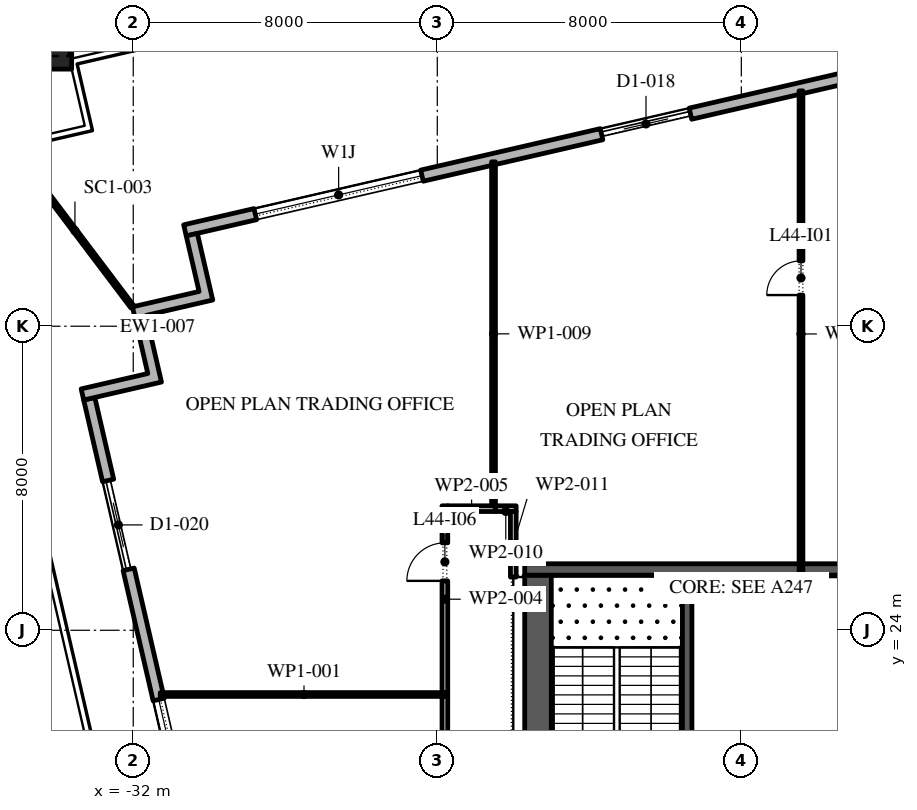
"""IFC4 building model, lengths in metres.
Left out: names, types, materials, properties, quantities, classifications, styles, units other than length and angle.
Written with IfcOpenShell. Run it as: python <this file> out.ifc"""

import sys

from ifc_helpers import new_model, si_unit, direction, frame, frame_2d, origin, origin_2d, place, context, subcontext, project, spatial, polyline, rectangle, outline, extrude, element, fill, save


model = new_model("IFC4")
c1 = context("Model", 3, precision=1e-05, world=origin(), true_north=direction((0.0, 1.0)))
c2 = subcontext(c1, "Body", "Model", "MODEL_VIEW")
j1 = project(units=[si_unit("LENGTHUNIT", "METRE"), si_unit("PLANEANGLEUNIT", "RADIAN")], contexts=[c1])
p1 = place(None, origin())
s1 = spatial("IfcSite", under=j1, at=p1, CompositionType="ELEMENT")
p2 = place(p1, origin())
s2 = spatial("IfcBuilding", under=s1, at=p2, CompositionType="ELEMENT")
p3 = place(p2, frame((0.0, 0.0, 201.0)))
s3 = spatial("IfcBuildingStorey", under=s2, at=p3, CompositionType="ELEMENT", Elevation=201.0)
p4 = place(p3, frame((-34.22, 39.365, 0.0), z_axis=(-0.018825755928, 0.08155896722, 0.996490705315), x_axis=(-0.974379530941, -0.22491004798, 0.0)))
e1 = element("IfcColumn", 1, at=p4, inside=s3, PredefinedType="COLUMN", context=c2, shape_type="SweptSolid", body=[
    extrude(rectangle(XDim=1.2, YDim=1.2, at=origin_2d()), origin(), (0.0, 0.0, 1.0), 4.215),
])
p5 = place(p3, frame((17.592, 45.657, 0.0), z_axis=(0.0, 0.0, 1.0), x_axis=(-0.974370243697, -0.224950279389, 0.0)))
e2 = element("IfcWall", 2, at=p5, inside=s3, PredefinedType="STANDARD", context=c2, shape_type="SweptSolid", body=[
    extrude(rectangle(XDim=49.5, YDim=0.3, at=frame_2d((24.75, 0.0))), origin(), (0.0, 0.0, 1.0), 4.0),
])
p6 = place(p5, frame((2.8, 0.0, 0.0)))
e3 = element("IfcOpeningElement", 3, at=p6, cuts=e2, PredefinedType="OPENING", context=c2, shape_type="SweptSolid", body=[
    extrude(rectangle(XDim=2.4, YDim=3.5, at=frame_2d((1.2, 1.75))), frame((0.0, 0.16, 0.0), z_axis=(0.0, -1.0, 0.0), x_axis=(1.0, 0.0, 0.0)), (0.0, 0.0, 1.0), 0.32),
])
p7 = place(p5, frame((9.9, 0.0, 0.45)))
e4 = element("IfcOpeningElement", 4, at=p7, cuts=e2, PredefinedType="OPENING", context=c2, shape_type="SweptSolid", body=[
    extrude(rectangle(XDim=4.5, YDim=2.45, at=frame_2d((2.25, 1.225))), frame((0.0, 0.16, 0.0), z_axis=(0.0, -1.0, 0.0), x_axis=(1.0, 0.0, 0.0)), (0.0, 0.0, 1.0), 0.32),
])
p8 = place(p5, frame((18.2, 0.0, 0.45)))
e5 = element("IfcOpeningElement", 5, at=p8, cuts=e2, PredefinedType="OPENING", context=c2, shape_type="SweptSolid", body=[
    extrude(rectangle(XDim=4.5, YDim=2.45, at=frame_2d((2.25, 1.225))), frame((0.0, 0.16, 0.0), z_axis=(0.0, -1.0, 0.0), x_axis=(1.0, 0.0, 0.0)), (0.0, 0.0, 1.0), 0.32),
])
p9 = place(p5, frame((26.5, 0.0, 0.45)))
e6 = element("IfcOpeningElement", 6, at=p9, cuts=e2, PredefinedType="OPENING", context=c2, shape_type="SweptSolid", body=[
    extrude(rectangle(XDim=4.5, YDim=2.5, at=frame_2d((2.25, 1.25))), frame((0.0, 0.16, 0.0), z_axis=(0.0, -1.0, 0.0), x_axis=(1.0, 0.0, 0.0)), (0.0, 0.0, 1.0), 0.32),
])
p10 = place(p5, frame((35.85, 0.0, 0.0)))
e7 = element("IfcOpeningElement", 7, at=p10, cuts=e2, PredefinedType="OPENING", context=c2, shape_type="SweptSolid", body=[
    extrude(rectangle(XDim=2.4, YDim=3.5, at=frame_2d((1.2, 1.75))), frame((0.0, 0.16, 0.0), z_axis=(0.0, -1.0, 0.0), x_axis=(1.0, 0.0, 0.0)), (0.0, 0.0, 1.0), 0.32),
])
p11 = place(p5, frame((43.1, 0.0, 0.45)))
e8 = element("IfcOpeningElement", 8, at=p11, cuts=e2, PredefinedType="OPENING", context=c2, shape_type="SweptSolid", body=[
    extrude(rectangle(XDim=4.5, YDim=2.675, at=frame_2d((2.25, 1.337))), frame((0.0, 0.16, 0.0), z_axis=(0.0, -1.0, 0.0), x_axis=(1.0, 0.0, 0.0)), (0.0, 0.0, 1.0), 0.32),
])
p12 = place(p3, frame((-33.157, 30.092, 0.0), z_axis=(0.0, 0.0, 1.0), x_axis=(0.224950279389, -0.974370243697, 0.0)))
e9 = element("IfcWall", 9, at=p12, inside=s3, PredefinedType="STANDARD", context=c2, shape_type="SweptSolid", body=[
    extrude(rectangle(XDim=49.5, YDim=0.3, at=frame_2d((24.75, 0.0))), origin(), (0.0, 0.0, 1.0), 4.0),
])
p13 = place(p12, frame((2.207, 0.0, 0.0)))
e10 = element("IfcOpeningElement", 10, at=p13, cuts=e9, PredefinedType="OPENING", context=c2, shape_type="SweptSolid", body=[
    extrude(rectangle(XDim=2.4, YDim=3.5, at=frame_2d((1.2, 1.75))), frame((0.0, 0.16, 0.0), z_axis=(0.0, -1.0, 0.0), x_axis=(1.0, 0.0, 0.0)), (0.0, 0.0, 1.0), 0.32),
])
p14 = place(p12, frame((8.121, 0.0, 0.45)))
e11 = element("IfcOpeningElement", 11, at=p14, cuts=e9, PredefinedType="OPENING", context=c2, shape_type="SweptSolid", body=[
    extrude(rectangle(XDim=4.5, YDim=2.825, at=frame_2d((2.25, 1.413))), frame((0.0, 0.16, 0.0), z_axis=(0.0, -1.0, 0.0), x_axis=(1.0, 0.0, 0.0)), (0.0, 0.0, 1.0), 0.32),
])
p15 = place(p12, frame((15.236, 0.0, 0.45)))
e12 = element("IfcOpeningElement", 12, at=p15, cuts=e9, PredefinedType="OPENING", context=c2, shape_type="SweptSolid", body=[
    extrude(rectangle(XDim=4.5, YDim=2.95, at=frame_2d((2.25, 1.475))), frame((0.0, 0.16, 0.0), z_axis=(0.0, -1.0, 0.0), x_axis=(1.0, 0.0, 0.0)), (0.0, 0.0, 1.0), 0.32),
])
p16 = place(p12, frame((22.35, 0.0, 0.45)))
e13 = element("IfcOpeningElement", 13, at=p16, cuts=e9, PredefinedType="OPENING", context=c2, shape_type="SweptSolid", body=[
    extrude(rectangle(XDim=4.5, YDim=3.0, at=frame_2d((2.25, 1.5))), frame((0.0, 0.16, 0.0), z_axis=(0.0, -1.0, 0.0), x_axis=(1.0, 0.0, 0.0)), (0.0, 0.0, 1.0), 0.32),
])
p17 = place(p12, frame((30.514, 0.0, 0.0)))
e14 = element("IfcOpeningElement", 14, at=p17, cuts=e9, PredefinedType="OPENING", context=c2, shape_type="SweptSolid", body=[
    extrude(rectangle(XDim=2.4, YDim=3.5, at=frame_2d((1.2, 1.75))), frame((0.0, 0.16, 0.0), z_axis=(0.0, -1.0, 0.0), x_axis=(1.0, 0.0, 0.0)), (0.0, 0.0, 1.0), 0.32),
])
p18 = place(p12, frame((36.579, 0.0, 0.45)))
e15 = element("IfcOpeningElement", 15, at=p18, cuts=e9, PredefinedType="OPENING", context=c2, shape_type="SweptSolid", body=[
    extrude(rectangle(XDim=4.5, YDim=3.05, at=frame_2d((2.25, 1.525))), frame((0.0, 0.16, 0.0), z_axis=(0.0, -1.0, 0.0), x_axis=(1.0, 0.0, 0.0)), (0.0, 0.0, 1.0), 0.32),
])
p19 = place(p12, frame((43.693, 0.0, 0.45)))
e16 = element("IfcOpeningElement", 16, at=p19, cuts=e9, PredefinedType="OPENING", context=c2, shape_type="SweptSolid", body=[
    extrude(rectangle(XDim=4.5, YDim=3.05, at=frame_2d((2.25, 1.525))), frame((0.0, 0.16, 0.0), z_axis=(0.0, -1.0, 0.0), x_axis=(1.0, 0.0, 0.0)), (0.0, 0.0, 1.0), 0.32),
])
p20 = place(p3, origin())
e17 = element("IfcWall", 17, at=p20, inside=s3, PredefinedType="STANDARD", context=c2, shape_type="SweptSolid", body=[
    extrude(outline(polyline([(-31.617, 30.756), (-32.022, 32.51), (-30.268, 32.914), (-30.605, 34.376), (-30.313, 34.443), (-29.908, 32.69), (-31.662, 32.285), (-31.257, 30.531), (-33.303, 30.058), (-33.371, 30.351), (-31.617, 30.756)])), origin(), (0.0, 0.0, 1.0), 4.0),
])
p21 = place(p3, frame((-32.022, 32.51, -0.05), z_axis=(0.0, 0.0, 1.0), x_axis=(-0.602651359782, 0.798004598077, 0.0)))
e18 = element("IfcWall", 18, at=p21, inside=s3, PredefinedType="STANDARD", context=c2, shape_type="SweptSolid", body=[
    extrude(rectangle(XDim=5.018, YDim=0.1, at=frame_2d((2.509, 0.0))), origin(), (0.0, 0.0, 1.0), 4.05),
])
p22 = place(p3, frame((-21.35, -2.45, 0.0), z_axis=(0.0, 0.0, 1.0), x_axis=(0.0, 1.0, 0.0)))
e19 = element("IfcWall", 19, at=p22, inside=s3, PredefinedType="SHEAR", context=c2, shape_type="SweptSolid", body=[
    extrude(rectangle(XDim=27.9, YDim=0.7, at=frame_2d((13.95, 0.0))), origin(), (0.0, 0.0, 1.0), 4.0),
])
p23 = place(p22, frame((5.05, 0.0, 0.0)))
e20 = element("IfcOpeningElement", 20, at=p23, cuts=e19, PredefinedType="OPENING", context=c2, shape_type="SweptSolid", body=[
    extrude(rectangle(XDim=1.2, YDim=2.1, at=frame_2d((0.6, 1.05))), frame((0.0, 0.36, 0.0), z_axis=(0.0, -1.0, 0.0), x_axis=(1.0, 0.0, 0.0)), (0.0, 0.0, 1.0), 0.72),
])
p24 = place(p22, frame((21.65, 0.0, 0.0)))
e21 = element("IfcOpeningElement", 21, at=p24, cuts=e19, PredefinedType="OPENING", context=c2, shape_type="SweptSolid", body=[
    extrude(rectangle(XDim=1.2, YDim=2.1, at=frame_2d((0.6, 1.05))), frame((0.0, 0.36, 0.0), z_axis=(0.0, -1.0, 0.0), x_axis=(1.0, 0.0, 0.0)), (0.0, 0.0, 1.0), 0.72),
])
p25 = place(p3, frame((-21.7, 25.6, 0.0), z_axis=(0.0, 0.0, 1.0), x_axis=(1.0, 0.0, 0.0)))
e22 = element("IfcWall", 22, at=p25, inside=s3, PredefinedType="SHEAR", context=c2, shape_type="SweptSolid", body=[
    extrude(rectangle(XDim=11.4, YDim=0.3, at=frame_2d((5.7, 0.0))), origin(), (0.0, 0.0, 1.0), 4.0),
])
p26 = place(p3, frame((-17.425, 19.15, 0.0), z_axis=(0.0, 0.0, 1.0), x_axis=(0.0, 1.0, 0.0)))
e23 = element("IfcWall", 23, at=p26, inside=s3, PredefinedType="SHEAR", context=c2, shape_type="SweptSolid", body=[
    extrude(rectangle(XDim=6.3, YDim=0.25, at=frame_2d((3.15, 0.0))), origin(), (0.0, 0.0, 1.0), 4.0),
])
p27 = place(p26, frame((0.05, 0.0, 0.0)))
e24 = element("IfcOpeningElement", 24, at=p27, cuts=e23, PredefinedType="OPENING", context=c2, shape_type="SweptSolid", body=[
    extrude(rectangle(XDim=1.2, YDim=2.1, at=frame_2d((0.6, 1.05))), frame((0.0, 0.135, 0.0), z_axis=(0.0, -1.0, 0.0), x_axis=(1.0, 0.0, 0.0)), (0.0, 0.0, 1.0), 0.27),
])
p28 = place(p3, frame((-31.289, 22.31, 0.0), z_axis=(0.0, 0.0, 1.0), x_axis=(1.0, 0.0, 0.0)))
e25 = element("IfcWall", 25, at=p28, inside=s3, PredefinedType="PARTITIONING", context=c2, shape_type="SweptSolid", body=[
    extrude(rectangle(XDim=7.564, YDim=0.1, at=frame_2d((3.782, 0.0))), origin(), (0.0, 0.0, 1.0), 4.0),
])
p29 = place(p3, frame((-23.8, -5.075, 0.0), z_axis=(0.0, 0.0, 1.0), x_axis=(0.0, 1.0, 0.0)))
e26 = element("IfcWall", 26, at=p29, inside=s3, PredefinedType="PARTITIONING", context=c2, shape_type="SweptSolid", body=[
    extrude(rectangle(XDim=27.335, YDim=0.15, at=frame_2d((13.667, 0.0))), origin(), (0.0, 0.0, 1.0), 4.0),
])
p30 = place(p29, frame((15.985, 0.0, 0.0)))
e27 = element("IfcOpeningElement", 27, at=p30, cuts=e26, PredefinedType="OPENING", context=c2, shape_type="SweptSolid", body=[
    extrude(rectangle(XDim=1.0, YDim=2.1, at=frame_2d((0.5, 1.05))), frame((0.0, 0.085, 0.0), z_axis=(0.0, -1.0, 0.0), x_axis=(1.0, 0.0, 0.0)), (0.0, 0.0, 1.0), 0.17),
])
p31 = place(p3, frame((-23.8, 22.36, 0.0), z_axis=(0.0, 0.0, 1.0), x_axis=(0.0, 1.0, 0.0)))
e28 = element("IfcWall", 28, at=p31, inside=s3, PredefinedType="PARTITIONING", context=c2, shape_type="SweptSolid", body=[
    extrude(rectangle(XDim=4.915, YDim=0.15, at=frame_2d((2.458, 0.0))), origin(), (0.0, 0.0, 1.0), 4.0),
])
p32 = place(p31, frame((2.94, 0.0, 0.0)))
e29 = element("IfcOpeningElement", 29, at=p32, cuts=e28, PredefinedType="OPENING", context=c2, shape_type="SweptSolid", body=[
    extrude(rectangle(XDim=1.0, YDim=2.1, at=frame_2d((0.5, 1.05))), frame((0.0, 0.085, 0.0), z_axis=(0.0, -1.0, 0.0), x_axis=(1.0, 0.0, 0.0)), (0.0, 0.0, 1.0), 0.17),
])
p33 = place(p3, frame((-23.725, 27.2, 0.0), z_axis=(0.0, 0.0, 1.0), x_axis=(1.0, 0.0, 0.0)))
e30 = element("IfcWall", 30, at=p33, inside=s3, PredefinedType="PARTITIONING", context=c2, shape_type="SweptSolid", body=[
    extrude(rectangle(XDim=1.255, YDim=0.15, at=frame_2d((0.627, 0.0))), origin(), (0.0, 0.0, 1.0), 4.0),
])
p34 = place(p3, frame((-22.52, 27.275, 0.0), z_axis=(0.0, 0.0, 1.0), x_axis=(0.0, 1.0, 0.0)))
e31 = element("IfcWall", 31, at=p34, inside=s3, PredefinedType="PARTITIONING", context=c2, shape_type="SweptSolid", body=[
    extrude(rectangle(XDim=9.05, YDim=0.1, at=frame_2d((4.525, 0.0))), origin(), (0.0, 0.0, 1.0), 4.0),
])
p35 = place(p3, frame((-22.47, 27.2, 0.0), z_axis=(0.0, 0.0, 1.0), x_axis=(1.0, 0.0, 0.0)))
e32 = element("IfcWall", 32, at=p35, inside=s3, PredefinedType="PARTITIONING", context=c2, shape_type="SweptSolid", body=[
    extrude(rectangle(XDim=0.545, YDim=0.15, at=frame_2d((0.272, 0.0))), origin(), (0.0, 0.0, 1.0), 4.0),
])
p36 = place(p3, frame((-22.0, 27.125, 0.0), z_axis=(0.0, 0.0, 1.0), x_axis=(0.0, -1.0, 0.0)))
e33 = element("IfcWall", 33, at=p36, inside=s3, PredefinedType="PARTITIONING", context=c2, shape_type="SweptSolid", body=[
    extrude(rectangle(XDim=1.725, YDim=0.15, at=frame_2d((0.863, 0.0))), origin(), (0.0, 0.0, 1.0), 4.0),
])
p37 = place(p3, frame((-14.43, 38.193, 0.0), z_axis=(0.0, 0.0, 1.0), x_axis=(0.0, -1.0, 0.0)))
e34 = element("IfcWall", 34, at=p37, inside=s3, PredefinedType="PARTITIONING", context=c2, shape_type="SweptSolid", body=[
    extrude(rectangle(XDim=12.793, YDim=0.1, at=frame_2d((6.396, 0.0))), origin(), (0.0, 0.0, 1.0), 4.0),
])
p38 = place(p37, frame((4.473, 0.0, 0.0)))
e35 = element("IfcOpeningElement", 35, at=p38, cuts=e34, PredefinedType="OPENING", context=c2, shape_type="SweptSolid", body=[
    extrude(rectangle(XDim=0.9, YDim=2.1, at=frame_2d((0.45, 1.05))), frame((0.0, 0.06, 0.0), z_axis=(0.0, -1.0, 0.0), x_axis=(1.0, 0.0, 0.0)), (0.0, 0.0, 1.0), 0.12),
])
p39 = place(p10, origin())
e36 = element("IfcDoor", 36, at=p39, inside=s3, OperationType="DOUBLE_DOOR_SLIDING", PredefinedType="DOOR", context=c2, shape_type="SweptSolid", body=[
    extrude(rectangle(XDim=2.4, YDim=3.5, at=frame_2d((1.2, 1.75))), frame((0.0, 0.025, 0.0), z_axis=(0.0, -1.0, 0.0), x_axis=(1.0, 0.0, 0.0)), (0.0, 0.0, 1.0), 0.05),
])
fill(e7, e36)
p40 = place(p11, origin())
e37 = element("IfcWindow", 37, at=p40, inside=s3, PartitioningType="DOUBLE_PANEL_VERTICAL", PredefinedType="WINDOW", context=c2, shape_type="SweptSolid", body=[
    extrude(rectangle(XDim=4.5, YDim=2.675, at=frame_2d((2.25, 1.337))), frame((0.0, 0.03, 0.0), z_axis=(0.0, -1.0, 0.0), x_axis=(1.0, 0.0, 0.0)), (0.0, 0.0, 1.0), 0.06),
])
fill(e8, e37)
p41 = place(p13, origin())
e38 = element("IfcDoor", 38, at=p41, inside=s3, OperationType="DOUBLE_DOOR_SLIDING", PredefinedType="DOOR", context=c2, shape_type="SweptSolid", body=[
    extrude(rectangle(XDim=2.4, YDim=3.5, at=frame_2d((1.2, 1.75))), frame((0.0, 0.025, 0.0), z_axis=(0.0, -1.0, 0.0), x_axis=(1.0, 0.0, 0.0)), (0.0, 0.0, 1.0), 0.05),
])
fill(e10, e38)
p42 = place(p14, origin())
e39 = element("IfcWindow", 39, at=p42, inside=s3, PartitioningType="DOUBLE_PANEL_VERTICAL", PredefinedType="WINDOW", context=c2, shape_type="SweptSolid", body=[
    extrude(rectangle(XDim=4.5, YDim=2.825, at=frame_2d((2.25, 1.413))), frame((0.0, 0.03, 0.0), z_axis=(0.0, -1.0, 0.0), x_axis=(1.0, 0.0, 0.0)), (0.0, 0.0, 1.0), 0.06),
])
fill(e11, e39)
p43 = place(p38, frame((0.9, 0.0, 0.0), z_axis=(0.0, 0.0, 1.0), x_axis=(-1.0, 0.0, 0.0)))
e40 = element("IfcDoor", 40, at=p43, inside=s3, OperationType="SINGLE_SWING_RIGHT", PredefinedType="DOOR", context=c2, shape_type="SweptSolid", body=[
    extrude(rectangle(XDim=0.9, YDim=2.1, at=frame_2d((0.45, 1.05))), frame((0.0, 0.025, 0.0), z_axis=(0.0, -1.0, 0.0), x_axis=(1.0, 0.0, 0.0)), (0.0, 0.0, 1.0), 0.05),
])
fill(e35, e40)
p44 = place(p32, origin())
e41 = element("IfcDoor", 41, at=p44, inside=s3, OperationType="SINGLE_SWING_RIGHT", PredefinedType="DOOR", context=c2, shape_type="SweptSolid", body=[
    extrude(rectangle(XDim=1.0, YDim=2.1, at=frame_2d((0.5, 1.05))), frame((0.0, 0.025, 0.0), z_axis=(0.0, -1.0, 0.0), x_axis=(1.0, 0.0, 0.0)), (0.0, 0.0, 1.0), 0.05),
])
fill(e29, e41)
save(model, sys.argv[1])
